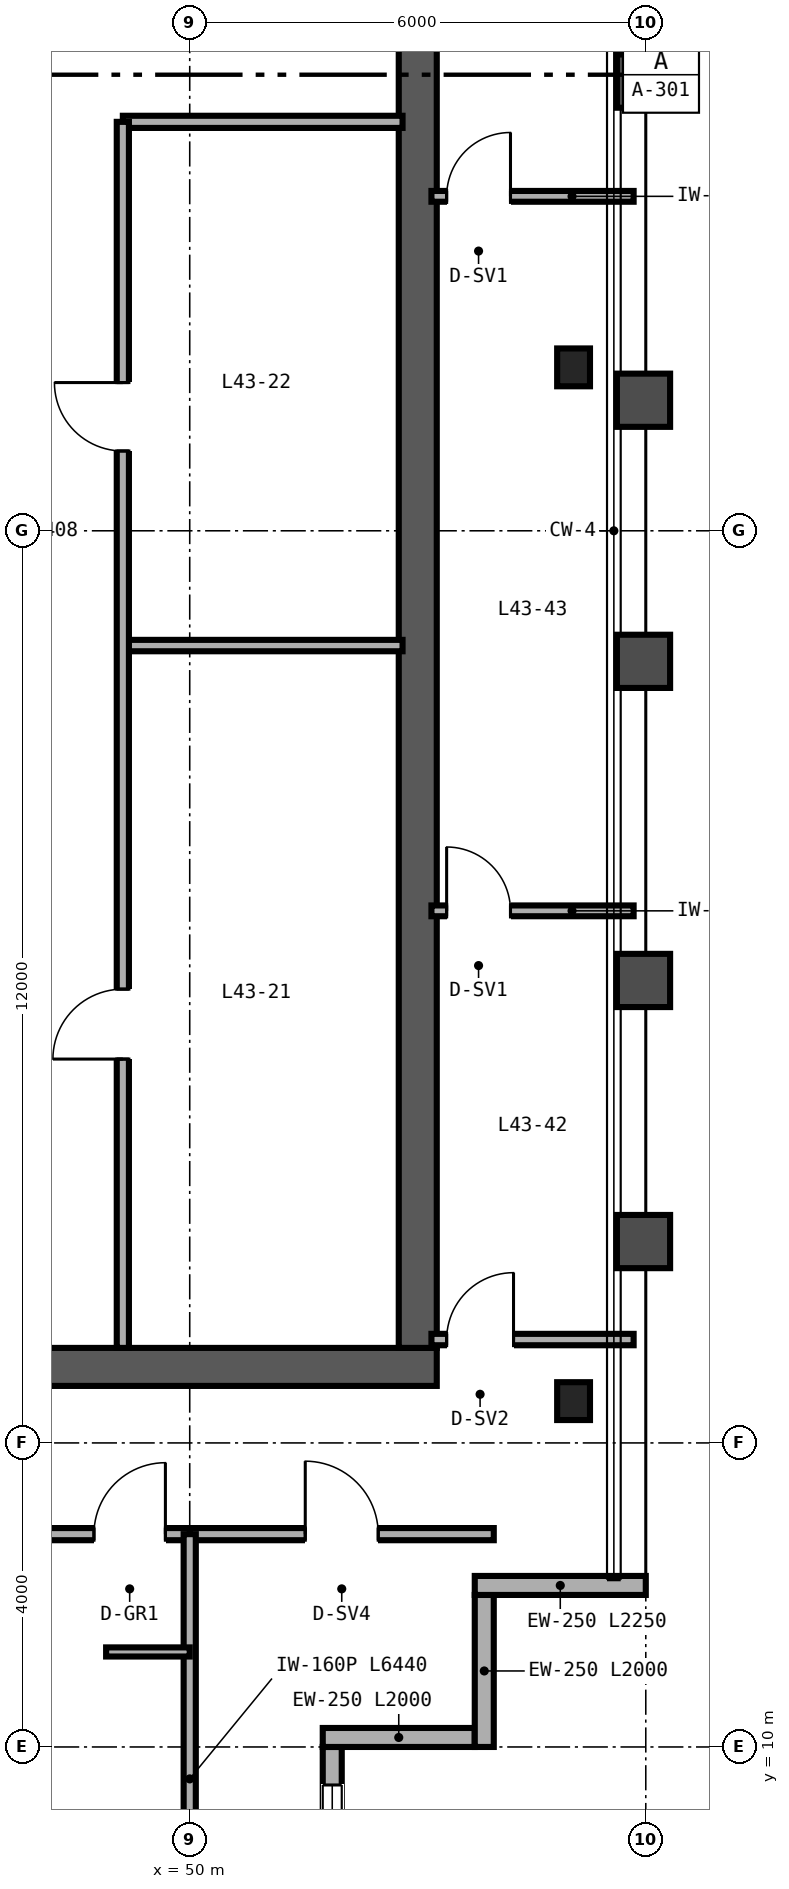
"""IFC4 building model, lengths in metres.
Left out: names, types, materials, properties, quantities, classifications, styles, units other than length and angle.
Written with IfcOpenShell. Run it as: python <this file> out.ifc"""

import sys

from ifc_helpers import new_model, si_unit, direction, frame, frame_2d, origin, origin_2d, place, context, subcontext, project, spatial, rectangle, i_section, extrude, source, transform, mapped, element, fill, save


model = new_model("IFC4")
c1 = context("Model", 3, precision=1e-05, world=origin(), true_north=direction((0.0, 1.0)))
c2 = subcontext(c1, "Body", "Model", "MODEL_VIEW")
j1 = project(units=[si_unit("LENGTHUNIT", "METRE"), si_unit("PLANEANGLEUNIT", "RADIAN")], contexts=[c1])
p1 = place(None, origin())
s1 = spatial("IfcSite", under=j1, at=p1, CompositionType="ELEMENT")
p2 = place(p1, origin())
s2 = spatial("IfcBuilding", under=s1, at=p2, CompositionType="ELEMENT")
p3 = place(p2, frame((0.0, 0.0, 174.0)))
s3 = spatial("IfcBuildingStorey", under=s2, at=p3, CompositionType="ELEMENT", Elevation=174.0)
p4 = place(p3, frame((40.75, 15.0, 0.0), z_axis=(0.0, 0.0, 1.0), x_axis=(1.0, 0.0, 0.0)))
e1 = element("IfcWall", 1, at=p4, inside=s3, PredefinedType="SHEAR", context=c2, shape_type="SweptSolid", body=[
    extrude(rectangle(XDim=12.5, YDim=0.5, at=frame_2d((6.25, 0.0))), origin(), (0.0, 0.0, 1.0), 3.37),
])
p5 = place(p4, frame((4.35, 0.0, 0.0)))
e2 = element("IfcOpeningElement", 2, at=p5, cuts=e1, PredefinedType="OPENING", context=c2, shape_type="SweptSolid", body=[
    extrude(rectangle(XDim=1.0, YDim=2.15, at=frame_2d((0.5, 1.075))), frame((0.0, 0.26, 0.0), z_axis=(0.0, -1.0, 0.0), x_axis=(1.0, 0.0, 0.0)), (0.0, 0.0, 1.0), 0.52),
])
p6 = place(p3, frame((53.0, 15.25, 0.0), z_axis=(0.0, 0.0, 1.0), x_axis=(0.0, 1.0, 0.0)))
e3 = element("IfcWall", 3, at=p6, inside=s3, PredefinedType="SHEAR", context=c2, shape_type="SweptSolid", body=[
    extrude(rectangle(XDim=21.5, YDim=0.5, at=frame_2d((10.75, 0.0))), origin(), (0.0, 0.0, 1.0), 3.37),
])
m1 = source(origin(), c2, "Body", "SweptSolid", [
    extrude(i_section(OverallWidth=0.432, OverallDepth=0.498, WebThickness=0.056, FlangeThickness=0.089, FilletRadius=0.025, at=origin_2d()), origin(), (0.0, 0.0, 1.0), 3.37),
])
for number, where, z_axis, x_axis in (
    (4, (55.05, 14.55, 0.0), (0.0, 0.0, 1.0), (1.0, 0.0, 0.0)),
    (5, (55.05, 28.15, 0.0), (0.0, 0.0, 1.0), (1.0, 0.0, 0.0)),
):
    element("IfcColumn", number, at=place(p3, frame(where, z_axis=z_axis, x_axis=x_axis)), inside=s3, PredefinedType="COLUMN", context=c2, shape_type="MappedRepresentation", body=[
        mapped(m1, transform((0.0, 0.0, 0.0), scale=1.0)),
    ])
p7 = place(p3, frame((51.875, 8.0, 0.0), z_axis=(0.0, 0.0, 1.0), x_axis=(0.0, 1.0, 0.0)))
e6 = element("IfcWall", 6, at=p7, inside=s3, PredefinedType="SOLIDWALL", context=c2, shape_type="SweptSolid", body=[
    extrude(rectangle(XDim=2.0, YDim=0.25, at=frame_2d((1.0, 0.0))), origin(), (0.0, 0.0, 1.0), 3.37),
])
p8 = place(p7, frame((0.5, 0.0, 0.85)))
e7 = element("IfcOpeningElement", 7, at=p8, cuts=e6, PredefinedType="OPENING", context=c2, shape_type="SweptSolid", body=[
    extrude(rectangle(XDim=1.0, YDim=1.9, at=frame_2d((0.5, 0.95))), frame((0.0, 0.135, 0.0), z_axis=(0.0, -1.0, 0.0), x_axis=(1.0, 0.0, 0.0)), (0.0, 0.0, 1.0), 0.27),
])
for number, where, z_axis, x_axis in (
    (8, (51.75, 10.125, 0.0), (0.0, 0.0, 1.0), (1.0, 0.0, 0.0)),
    (9, (53.875, 10.0, 0.0), (0.0, 0.0, 1.0), (0.0, 1.0, 0.0)),
):
    element("IfcWall", number, at=place(p3, frame(where, z_axis=z_axis, x_axis=x_axis)), inside=s3, PredefinedType="SOLIDWALL", context=c2, shape_type="SweptSolid", body=[
        extrude(rectangle(XDim=2.0, YDim=0.25, at=frame_2d((1.0, 0.0))), origin(), (0.0, 0.0, 1.0), 3.37),
    ])
p9 = place(p3, frame((53.75, 12.125, 0.0), z_axis=(0.0, 0.0, 1.0), x_axis=(1.0, 0.0, 0.0)))
e10 = element("IfcWall", 10, at=p9, inside=s3, PredefinedType="SOLIDWALL", context=c2, shape_type="SweptSolid", body=[
    extrude(rectangle(XDim=2.25, YDim=0.25, at=frame_2d((1.125, 0.0))), origin(), (0.0, 0.0, 1.0), 3.37),
])
p10 = place(p3, frame((49.12, 31.38, 0.0), z_axis=(0.0, 0.0, 1.0), x_axis=(1.0, 0.0, 0.0)))
e11 = element("IfcWall", 11, at=p10, inside=s3, PredefinedType="PARTITIONING", context=c2, shape_type="SweptSolid", body=[
    extrude(rectangle(XDim=3.68, YDim=0.16, at=frame_2d((1.84, 0.0))), origin(), (0.0, 0.0, 1.0), 2.47),
])
p11 = place(p3, frame((49.12, 24.49, 0.0), z_axis=(0.0, 0.0, 1.0), x_axis=(1.0, 0.0, 0.0)))
e12 = element("IfcWall", 12, at=p11, inside=s3, PredefinedType="PARTITIONING", context=c2, shape_type="SweptSolid", body=[
    extrude(rectangle(XDim=3.68, YDim=0.15, at=frame_2d((1.84, 0.0))), origin(), (0.0, 0.0, 1.0), 3.37),
])
p12 = place(p3, frame((49.12, 15.25, 0.0), z_axis=(0.0, 0.0, 1.0), x_axis=(0.0, 1.0, 0.0)))
e13 = element("IfcWall", 13, at=p12, inside=s3, PredefinedType="PARTITIONING", context=c2, shape_type="SweptSolid", body=[
    extrude(rectangle(XDim=16.13, YDim=0.16, at=frame_2d((8.065, 0.0))), origin(), (0.0, 0.0, 1.0), 2.443),
])
p13 = place(p12, frame((3.8, 0.0, 0.0)))
e14 = element("IfcOpeningElement", 14, at=p13, cuts=e13, PredefinedType="OPENING", context=c2, shape_type="SweptSolid", body=[
    extrude(rectangle(XDim=0.92, YDim=2.15, at=frame_2d((0.46, 1.075))), frame((0.0, 0.09, 0.0), z_axis=(0.0, -1.0, 0.0), x_axis=(1.0, 0.0, 0.0)), (0.0, 0.0, 1.0), 0.18),
])
p14 = place(p12, frame((11.8, 0.0, 0.0)))
e15 = element("IfcOpeningElement", 15, at=p14, cuts=e13, PredefinedType="OPENING", context=c2, shape_type="SweptSolid", body=[
    extrude(rectangle(XDim=0.9, YDim=2.15, at=frame_2d((0.45, 1.075))), frame((0.0, 0.09, 0.0), z_axis=(0.0, -1.0, 0.0), x_axis=(1.0, 0.0, 0.0)), (0.0, 0.0, 1.0), 0.18),
])
p15 = place(p3, frame((53.18, 15.36, 0.0), z_axis=(0.0, 0.0, 1.0), x_axis=(1.0, 0.0, 0.0)))
e16 = element("IfcWall", 16, at=p15, inside=s3, PredefinedType="PARTITIONING", context=c2, shape_type="SweptSolid", body=[
    extrude(rectangle(XDim=2.66, YDim=0.15, at=frame_2d((1.33, 0.0))), origin(), (0.0, 0.0, 1.0), 2.591),
])
p16 = place(p15, frame((0.2, 0.0, 0.0)))
e17 = element("IfcOpeningElement", 17, at=p16, cuts=e16, PredefinedType="OPENING", context=c2, shape_type="SweptSolid", body=[
    extrude(rectangle(XDim=0.88, YDim=2.15, at=frame_2d((0.44, 1.075))), frame((0.0, 0.085, 0.0), z_axis=(0.0, -1.0, 0.0), x_axis=(1.0, 0.0, 0.0)), (0.0, 0.0, 1.0), 0.17),
])
p17 = place(p3, frame((53.18, 21.0, 0.0), z_axis=(0.0, 0.0, 1.0), x_axis=(1.0, 0.0, 0.0)))
e18 = element("IfcWall", 18, at=p17, inside=s3, PredefinedType="PARTITIONING", context=c2, shape_type="SweptSolid", body=[
    extrude(rectangle(XDim=2.66, YDim=0.142, at=frame_2d((1.33, 0.0))), origin(), (0.0, 0.0, 1.0), 2.591),
])
p18 = place(p17, frame((0.2, 0.0, 0.0)))
e19 = element("IfcOpeningElement", 19, at=p18, cuts=e18, PredefinedType="OPENING", context=c2, shape_type="SweptSolid", body=[
    extrude(rectangle(XDim=0.84, YDim=2.1, at=frame_2d((0.42, 1.05))), frame((0.0, 0.081, 0.0), z_axis=(0.0, -1.0, 0.0), x_axis=(1.0, 0.0, 0.0)), (0.0, 0.0, 1.0), 0.162),
])
p19 = place(p3, frame((53.18, 30.4, 0.0), z_axis=(0.0, 0.0, 1.0), x_axis=(1.0, 0.0, 0.0)))
e20 = element("IfcWall", 20, at=p19, inside=s3, PredefinedType="PARTITIONING", context=c2, shape_type="SweptSolid", body=[
    extrude(rectangle(XDim=2.66, YDim=0.142, at=frame_2d((1.33, 0.0))), origin(), (0.0, 0.0, 1.0), 2.753),
])
p20 = place(p19, frame((0.2, 0.0, 0.0)))
e21 = element("IfcOpeningElement", 21, at=p20, cuts=e20, PredefinedType="OPENING", context=c2, shape_type="SweptSolid", body=[
    extrude(rectangle(XDim=0.84, YDim=2.1, at=frame_2d((0.42, 1.05))), frame((0.0, 0.081, 0.0), z_axis=(0.0, -1.0, 0.0), x_axis=(1.0, 0.0, 0.0)), (0.0, 0.0, 1.0), 0.162),
])
p21 = place(p3, frame((50.0, 12.8, 0.0), z_axis=(0.0, 0.0, 1.0), x_axis=(1.0, 0.0, 0.0)))
e22 = element("IfcWall", 22, at=p21, inside=s3, PredefinedType="PARTITIONING", context=c2, shape_type="SweptSolid", body=[
    extrude(rectangle(XDim=4.0, YDim=0.16, at=frame_2d((2.0, 0.0))), origin(), (0.0, 0.0, 1.0), 3.37),
])
p22 = place(p21, frame((1.52, 0.0, 0.0)))
e23 = element("IfcOpeningElement", 23, at=p22, cuts=e22, PredefinedType="OPENING", context=c2, shape_type="SweptSolid", body=[
    extrude(rectangle(XDim=0.96, YDim=2.15, at=frame_2d((0.48, 1.075))), frame((0.0, 0.09, 0.0), z_axis=(0.0, -1.0, 0.0), x_axis=(1.0, 0.0, 0.0)), (0.0, 0.0, 1.0), 0.18),
])
p23 = place(p3, frame((38.0, 12.8, 0.0), z_axis=(0.0, 0.0, 1.0), x_axis=(1.0, 0.0, 0.0)))
e24 = element("IfcWall", 24, at=p23, inside=s3, PredefinedType="PARTITIONING", context=c2, shape_type="SweptSolid", body=[
    extrude(rectangle(XDim=12.0, YDim=0.16, at=frame_2d((6.0, 0.0))), origin(), (0.0, 0.0, 1.0), 2.913),
])
p24 = place(p23, frame((4.94, 0.0, 0.0)))
e25 = element("IfcOpeningElement", 25, at=p24, cuts=e24, PredefinedType="OPENING", context=c2, shape_type="SweptSolid", body=[
    extrude(rectangle(XDim=0.94, YDim=2.15, at=frame_2d((0.47, 1.075))), frame((0.0, 0.09, 0.0), z_axis=(0.0, -1.0, 0.0), x_axis=(1.0, 0.0, 0.0)), (0.0, 0.0, 1.0), 0.18),
])
p25 = place(p23, frame((10.74, 0.0, 0.0)))
e26 = element("IfcOpeningElement", 26, at=p25, cuts=e24, PredefinedType="OPENING", context=c2, shape_type="SweptSolid", body=[
    extrude(rectangle(XDim=0.94, YDim=2.15, at=frame_2d((0.47, 1.075))), frame((0.0, 0.09, 0.0), z_axis=(0.0, -1.0, 0.0), x_axis=(1.0, 0.0, 0.0)), (0.0, 0.0, 1.0), 0.18),
])
p26 = place(p3, frame((50.0, 6.36, 0.0), z_axis=(0.0, 0.0, 1.0), x_axis=(0.0, 1.0, 0.0)))
e27 = element("IfcWall", 27, at=p26, inside=s3, PredefinedType="PARTITIONING", context=c2, shape_type="SweptSolid", body=[
    extrude(rectangle(XDim=6.44, YDim=0.16, at=frame_2d((3.22, 0.0))), origin(), (0.0, 0.0, 1.0), 2.677),
])
p27 = place(p3, frame((48.9, 11.25, 0.0), z_axis=(0.0, 0.0, 1.0), x_axis=(1.0, 0.0, 0.0)))
e28 = element("IfcWall", 28, at=p27, inside=s3, PredefinedType="PARTITIONING", context=c2, shape_type="SweptSolid", body=[
    extrude(rectangle(XDim=1.1, YDim=0.12, at=frame_2d((0.55, 0.0))), origin(), (0.0, 0.0, 1.0), 3.37),
])
m2 = source(origin(), c2, "Body", "SweptSolid", [
    extrude(rectangle(XDim=1.0, YDim=1.9, at=frame_2d((0.5, 0.95))), frame((0.0, 0.03, 0.0), z_axis=(0.0, -1.0, 0.0), x_axis=(1.0, 0.0, 0.0)), (0.0, 0.0, 1.0), 0.06),
])
p28 = place(p8, origin())
e29 = element("IfcWindow", 29, at=p28, inside=s3, PartitioningType="SINGLE_PANEL", PredefinedType="WINDOW", context=c2, shape_type="MappedRepresentation", body=[
    mapped(m2, transform((0.0, 0.0, 0.0), scale=1.0)),
])
fill(e7, e29)
m3 = source(origin(), c2, "Body", "SweptSolid", [
    extrude(rectangle(XDim=0.92, YDim=2.15, at=frame_2d((0.46, 1.075))), frame((0.0, 0.025, 0.0), z_axis=(0.0, -1.0, 0.0), x_axis=(1.0, 0.0, 0.0)), (0.0, 0.0, 1.0), 0.05),
])
p29 = place(p13, origin())
e30 = element("IfcDoor", 30, at=p29, inside=s3, OperationType="SINGLE_SWING_LEFT", PredefinedType="DOOR", context=c2, shape_type="MappedRepresentation", body=[
    mapped(m3, transform((0.0, 0.0, 0.0), scale=1.0)),
])
fill(e14, e30)
m4 = source(origin(), c2, "Body", "SweptSolid", [
    extrude(rectangle(XDim=0.9, YDim=2.15, at=frame_2d((0.45, 1.075))), frame((0.0, 0.025, 0.0), z_axis=(0.0, -1.0, 0.0), x_axis=(1.0, 0.0, 0.0)), (0.0, 0.0, 1.0), 0.05),
])
p30 = place(p14, origin())
e31 = element("IfcDoor", 31, at=p30, inside=s3, OperationType="SINGLE_SWING_RIGHT", PredefinedType="DOOR", context=c2, shape_type="MappedRepresentation", body=[
    mapped(m4, transform((0.0, 0.0, 0.0), scale=1.0)),
])
fill(e15, e31)
m5 = source(origin(), c2, "Body", "SweptSolid", [
    extrude(rectangle(XDim=0.88, YDim=2.15, at=frame_2d((0.44, 1.075))), frame((0.0, 0.025, 0.0), z_axis=(0.0, -1.0, 0.0), x_axis=(1.0, 0.0, 0.0)), (0.0, 0.0, 1.0), 0.05),
])
p31 = place(p16, origin())
e32 = element("IfcDoor", 32, at=p31, inside=s3, OperationType="SINGLE_SWING_RIGHT", PredefinedType="DOOR", context=c2, shape_type="MappedRepresentation", body=[
    mapped(m5, transform((0.0, 0.0, 0.0), scale=1.0)),
])
fill(e17, e32)
m6 = source(origin(), c2, "Body", "SweptSolid", [
    extrude(rectangle(XDim=0.84, YDim=2.1, at=frame_2d((0.42, 1.05))), frame((0.0, 0.025, 0.0), z_axis=(0.0, -1.0, 0.0), x_axis=(1.0, 0.0, 0.0)), (0.0, 0.0, 1.0), 0.05),
])
p32 = place(p18, origin())
e33 = element("IfcDoor", 33, at=p32, inside=s3, OperationType="SINGLE_SWING_LEFT", PredefinedType="DOOR", context=c2, shape_type="MappedRepresentation", body=[
    mapped(m6, transform((0.0, 0.0, 0.0), scale=1.0)),
])
fill(e19, e33)
p33 = place(p20, origin())
e34 = element("IfcDoor", 34, at=p33, inside=s3, OperationType="SINGLE_SWING_RIGHT", PredefinedType="DOOR", context=c2, shape_type="MappedRepresentation", body=[
    mapped(m6, transform((0.0, 0.0, 0.0), scale=1.0)),
])
fill(e21, e34)
m7 = source(origin(), c2, "Body", "SweptSolid", [
    extrude(rectangle(XDim=0.96, YDim=2.15, at=frame_2d((0.48, 1.075))), frame((0.0, 0.025, 0.0), z_axis=(0.0, -1.0, 0.0), x_axis=(1.0, 0.0, 0.0)), (0.0, 0.0, 1.0), 0.05),
])
p34 = place(p22, origin())
e35 = element("IfcDoor", 35, at=p34, inside=s3, OperationType="SINGLE_SWING_LEFT", PredefinedType="DOOR", context=c2, shape_type="MappedRepresentation", body=[
    mapped(m7, transform((0.0, 0.0, 0.0), scale=1.0)),
])
fill(e23, e35)
m8 = source(origin(), c2, "Body", "SweptSolid", [
    extrude(rectangle(XDim=0.94, YDim=2.15, at=frame_2d((0.47, 1.075))), frame((0.0, 0.025, 0.0), z_axis=(0.0, -1.0, 0.0), x_axis=(1.0, 0.0, 0.0)), (0.0, 0.0, 1.0), 0.05),
])
p35 = place(p25, origin())
e36 = element("IfcDoor", 36, at=p35, inside=s3, OperationType="SINGLE_SWING_RIGHT", PredefinedType="DOOR", context=c2, shape_type="MappedRepresentation", body=[
    mapped(m8, transform((0.0, 0.0, 0.0), scale=1.0)),
])
fill(e26, e36)
save(model, sys.argv[1])
